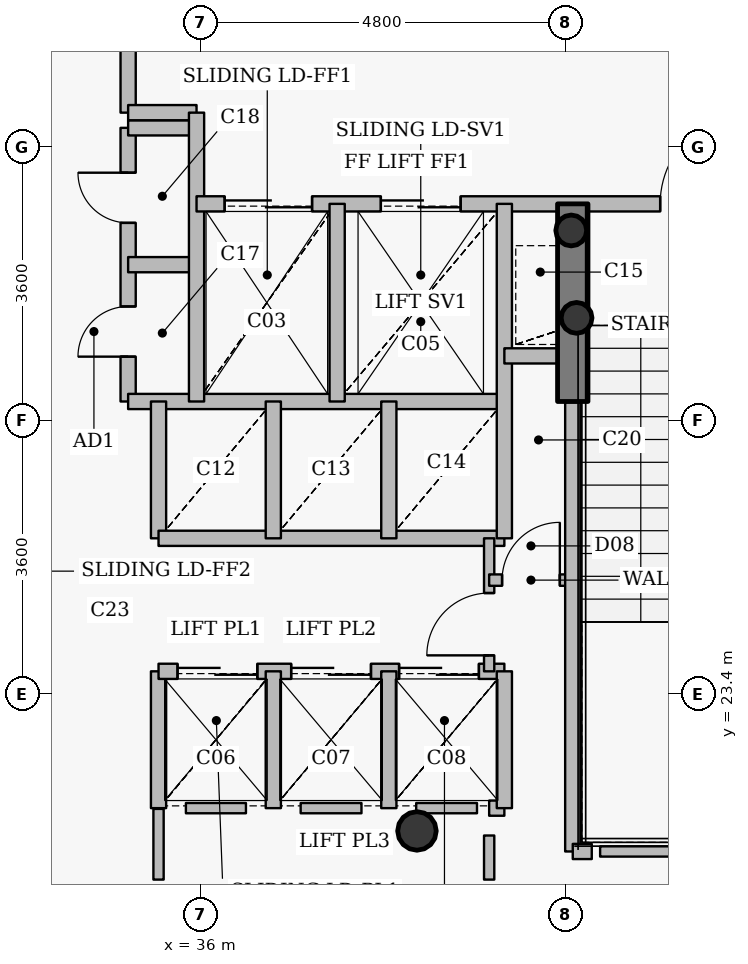
"""IFC4 building model, lengths in metres.
Left out: names, types, materials, properties, quantities, classifications, styles, units other than length and angle.
Written with IfcOpenShell. Run it as: python <this file> out.ifc"""

import sys

from ifc_helpers import new_model, si_unit, direction, frame, frame_2d, origin, origin_2d, place, context, subcontext, project, spatial, rectangle, hollow_circle, extrude, source, transform, mapped, element, fill, save


model = new_model("IFC4")
c1 = context("Model", 3, precision=1e-05, world=origin(), true_north=direction((0.0, 1.0)))
c2 = subcontext(c1, "Body", "Model", "MODEL_VIEW")
j1 = project(units=[si_unit("LENGTHUNIT", "METRE"), si_unit("PLANEANGLEUNIT", "RADIAN")], contexts=[c1])
p1 = place(None, origin())
s1 = spatial("IfcSite", under=j1, at=p1, CompositionType="ELEMENT")
p2 = place(p1, origin())
s2 = spatial("IfcBuilding", under=s1, at=p2, CompositionType="ELEMENT")
p3 = place(p2, frame((0.0, 0.0, 32.4)))
s3 = spatial("IfcBuildingStorey", under=s2, at=p3, CompositionType="ELEMENT", Elevation=32.4)
p4 = place(p3, frame((38.85, 21.6, 0.0), z_axis=(0.0, 0.0, 1.0), x_axis=(1.0, 0.0, 0.0)))
e1 = element("IfcColumn", 1, at=p4, inside=s3, PredefinedType="COLUMN", context=c2, shape_type="SweptSolid", body=[
    extrude(hollow_circle(Radius=0.254, WallThickness=0.02, at=origin_2d()), origin(), (0.0, 0.0, 1.0), 4.2),
])
for number, where, z_axis, x_axis in (
    (2, (40.95, 28.35, 0.0), (0.0, 0.0, 1.0), (1.0, 0.0, 0.0)),
    (3, (40.88, 29.5, 0.0), (0.0, 0.0, 1.0), (1.0, 0.0, 0.0)),
):
    element("IfcColumn", number, at=place(p3, frame(where, z_axis=z_axis, x_axis=x_axis)), inside=s3, PredefinedType="COLUMN", context=c2, shape_type="SweptSolid", body=[
        extrude(hollow_circle(Radius=0.203, WallThickness=0.016, at=origin_2d()), origin(), (0.0, 0.0, 1.0), 4.2),
    ])
p5 = place(p3, frame((40.9, 27.25, 0.0), z_axis=(0.0, 0.0, 1.0), x_axis=(0.0, 1.0, 0.0)))
e4 = element("IfcWall", 4, at=p5, inside=s3, PredefinedType="SHEAR", context=c2, shape_type="SweptSolid", body=[
    extrude(rectangle(XDim=2.6, YDim=0.4, at=frame_2d((1.3, 0.0))), origin(), (0.0, 0.0, 1.0), 3.55),
])
p6 = place(p3, frame((35.05, 27.25, 0.0), z_axis=(0.0, 0.0, 1.0), x_axis=(0.0, 1.0, 0.0)))
e5 = element("IfcWall", 5, at=p6, inside=s3, PredefinedType="PARTITIONING", context=c2, shape_type="SweptSolid", body=[
    extrude(rectangle(XDim=3.6, YDim=0.2, at=frame_2d((1.8, 0.0))), origin(), (0.0, 0.0, 1.0), 3.95),
])
p7 = place(p6, frame((0.59, 0.0, 0.0)))
e6 = element("IfcOpeningElement", 6, at=p7, cuts=e5, PredefinedType="OPENING", context=c2, shape_type="SweptSolid", body=[
    extrude(rectangle(XDim=0.66, YDim=2.05, at=origin_2d()), frame((0.33, 0.11, 1.025), z_axis=(0.0, -1.0, 0.0), x_axis=(1.0, 0.0, 0.0)), (0.0, 0.0, 1.0), 0.22),
])
p8 = place(p6, frame((2.35, 0.0, 0.0)))
e7 = element("IfcOpeningElement", 7, at=p8, cuts=e5, PredefinedType="OPENING", context=c2, shape_type="SweptSolid", body=[
    extrude(rectangle(XDim=0.66, YDim=2.05, at=origin_2d()), frame((0.33, 0.11, 1.025), z_axis=(0.0, -1.0, 0.0), x_axis=(1.0, 0.0, 0.0)), (0.0, 0.0, 1.0), 0.22),
])
p9 = place(p3, frame((35.05, 27.25, 0.0), z_axis=(0.0, 0.0, 1.0), x_axis=(1.0, 0.0, 0.0)))
e8 = element("IfcWall", 8, at=p9, inside=s3, PredefinedType="PARTITIONING", context=c2, shape_type="SweptSolid", body=[
    extrude(rectangle(XDim=4.95, YDim=0.2, at=frame_2d((2.475, 0.0))), origin(), (0.0, 0.0, 1.0), 3.535),
])
for number, where, z_axis, x_axis in (
    (9, (35.05, 29.05, 0.0), (0.0, 0.0, 1.0), (1.0, 0.0, 0.0)),
    (10, (35.05, 30.85, 0.0), (0.0, 0.0, 1.0), (1.0, 0.0, 0.0)),
):
    element("IfcWall", number, at=place(p3, frame(where, z_axis=z_axis, x_axis=x_axis)), inside=s3, PredefinedType="PARTITIONING", context=c2, shape_type="SweptSolid", body=[
        extrude(rectangle(XDim=0.9, YDim=0.2, at=frame_2d((0.45, 0.0))), origin(), (0.0, 0.0, 1.0), 3.95),
    ])
p10 = place(p3, frame((35.05, 31.05, 0.0), z_axis=(0.0, 0.0, 1.0), x_axis=(0.0, 1.0, 0.0)))
e11 = element("IfcWall", 11, at=p10, inside=s3, PredefinedType="PARTITIONING", context=c2, shape_type="SweptSolid", body=[
    extrude(rectangle(XDim=2.25, YDim=0.135, at=frame_2d((1.125, 0.0))), origin(), (0.0, 0.0, 1.0), 3.535),
])
p11 = place(p10, frame((0.575, 0.0, 0.0)))
e12 = element("IfcOpeningElement", 12, at=p11, cuts=e11, PredefinedType="OPENING", context=c2, shape_type="SweptSolid", body=[
    extrude(rectangle(XDim=1.1, YDim=2.15, at=origin_2d()), frame((0.55, 0.078, 1.075), z_axis=(0.0, -1.0, 0.0), x_axis=(1.0, 0.0, 0.0)), (0.0, 0.0, 1.0), 0.155),
])
p12 = place(p3, frame((35.05, 31.05, 0.0), z_axis=(0.0, 0.0, 1.0), x_axis=(1.0, 0.0, 0.0)))
e13 = element("IfcWall", 13, at=p12, inside=s3, PredefinedType="PARTITIONING", context=c2, shape_type="SweptSolid", body=[
    extrude(rectangle(XDim=0.9, YDim=0.135, at=frame_2d((0.45, 0.0))), origin(), (0.0, 0.0, 1.0), 3.95),
])
p13 = place(p3, frame((35.45, 21.9, 0.0), z_axis=(0.0, 0.0, 1.0), x_axis=(0.0, 1.0, 0.0)))
e14 = element("IfcWall", 14, at=p13, inside=s3, PredefinedType="PARTITIONING", context=c2, shape_type="SweptSolid", body=[
    extrude(rectangle(XDim=1.8, YDim=0.2, at=frame_2d((0.9, 0.0))), origin(), (0.0, 0.0, 1.0), 3.95),
])
p14 = place(p3, frame((35.45, 23.7, 0.0), z_axis=(0.0, 0.0, 1.0), x_axis=(1.0, 0.0, 0.0)))
e15 = element("IfcWall", 15, at=p14, inside=s3, PredefinedType="PARTITIONING", context=c2, shape_type="SweptSolid", body=[
    extrude(rectangle(XDim=4.55, YDim=0.2, at=frame_2d((2.275, 0.0))), origin(), (0.0, 0.0, 1.0), 3.535),
])
p15 = place(p14, frame((0.25, 0.0, 0.0)))
e16 = element("IfcOpeningElement", 16, at=p15, cuts=e15, PredefinedType="OPENING", context=c2, shape_type="SweptSolid", body=[
    extrude(rectangle(XDim=1.05, YDim=2.15, at=origin_2d()), frame((0.525, 0.11, 1.075), z_axis=(0.0, -1.0, 0.0), x_axis=(1.0, 0.0, 0.0)), (0.0, 0.0, 1.0), 0.22),
])
p16 = place(p14, frame((1.745, 0.0, 0.0)))
e17 = element("IfcOpeningElement", 17, at=p16, cuts=e15, PredefinedType="OPENING", context=c2, shape_type="SweptSolid", body=[
    extrude(rectangle(XDim=1.05, YDim=2.15, at=origin_2d()), frame((0.525, 0.11, 1.075), z_axis=(0.0, -1.0, 0.0), x_axis=(1.0, 0.0, 0.0)), (0.0, 0.0, 1.0), 0.22),
])
p17 = place(p14, frame((3.165, 0.0, 0.0)))
e18 = element("IfcOpeningElement", 18, at=p17, cuts=e15, PredefinedType="OPENING", context=c2, shape_type="SweptSolid", body=[
    extrude(rectangle(XDim=1.05, YDim=2.15, at=origin_2d()), frame((0.525, 0.11, 1.075), z_axis=(0.0, -1.0, 0.0), x_axis=(1.0, 0.0, 0.0)), (0.0, 0.0, 1.0), 0.22),
])
p18 = place(p3, frame((35.45, 25.45, 0.0), z_axis=(0.0, 0.0, 1.0), x_axis=(0.0, 1.0, 0.0)))
e19 = element("IfcWall", 19, at=p18, inside=s3, PredefinedType="PARTITIONING", context=c2, shape_type="SweptSolid", body=[
    extrude(rectangle(XDim=1.8, YDim=0.2, at=frame_2d((0.9, 0.0))), origin(), (0.0, 0.0, 1.0), 3.95),
])
p19 = place(p3, frame((35.45, 25.45, 0.0), z_axis=(0.0, 0.0, 1.0), x_axis=(1.0, 0.0, 0.0)))
e20 = element("IfcWall", 20, at=p19, inside=s3, PredefinedType="PARTITIONING", context=c2, shape_type="SweptSolid", body=[
    extrude(rectangle(XDim=4.55, YDim=0.2, at=frame_2d((2.275, 0.0))), origin(), (0.0, 0.0, 1.0), 3.535),
])
p20 = place(p3, frame((35.95, 27.25, 0.0), z_axis=(0.0, 0.0, 1.0), x_axis=(0.0, 1.0, 0.0)))
e21 = element("IfcWall", 21, at=p20, inside=s3, PredefinedType="PARTITIONING", context=c2, shape_type="SweptSolid", body=[
    extrude(rectangle(XDim=3.8, YDim=0.2, at=frame_2d((1.9, 0.0))), origin(), (0.0, 0.0, 1.0), 3.95),
])
p21 = place(p3, frame((35.95, 29.85, 0.0), z_axis=(0.0, 0.0, 1.0), x_axis=(1.0, 0.0, 0.0)))
e22 = element("IfcWall", 22, at=p21, inside=s3, PredefinedType="PARTITIONING", context=c2, shape_type="SweptSolid", body=[
    extrude(rectangle(XDim=8.49, YDim=0.2, at=frame_2d((4.245, 0.0))), origin(), (0.0, 0.0, 1.0), 3.535),
])
p22 = place(p21, frame((6.1, 0.0, 0.0)))
e23 = element("IfcOpeningElement", 23, at=p22, cuts=e22, PredefinedType="OPENING", context=c2, shape_type="SweptSolid", body=[
    extrude(rectangle(XDim=1.2, YDim=2.15, at=origin_2d()), frame((0.6, 0.11, 1.075), z_axis=(0.0, -1.0, 0.0), x_axis=(1.0, 0.0, 0.0)), (0.0, 0.0, 1.0), 0.22),
])
p23 = place(p21, frame((0.37, 0.0, 0.0)))
e24 = element("IfcOpeningElement", 24, at=p23, cuts=e22, PredefinedType="OPENING", context=c2, shape_type="SweptSolid", body=[
    extrude(rectangle(XDim=1.15, YDim=2.15, at=origin_2d()), frame((0.575, 0.11, 1.075), z_axis=(0.0, -1.0, 0.0), x_axis=(1.0, 0.0, 0.0)), (0.0, 0.0, 1.0), 0.22),
])
p24 = place(p21, frame((2.425, 0.0, 0.0)))
e25 = element("IfcOpeningElement", 25, at=p24, cuts=e22, PredefinedType="OPENING", context=c2, shape_type="SweptSolid", body=[
    extrude(rectangle(XDim=1.05, YDim=2.15, at=origin_2d()), frame((0.525, 0.11, 1.075), z_axis=(0.0, -1.0, 0.0), x_axis=(1.0, 0.0, 0.0)), (0.0, 0.0, 1.0), 0.22),
])
p25 = place(p3, frame((35.96, 31.05, 0.0), z_axis=(0.0, 0.0, 1.0), x_axis=(1.0, 0.0, 0.0)))
e26 = element("IfcWall", 26, at=p25, inside=s3, PredefinedType="PARTITIONING", context=c2, shape_type="SweptSolid", body=[
    extrude(rectangle(XDim=1.84, YDim=0.2, at=frame_2d((0.92, 0.0))), origin(), (0.0, 0.0, 1.0), 3.95),
])
for number, where, z_axis, x_axis in (
    (27, (36.96, 21.9, 0.0), (0.0, 0.0, 1.0), (0.0, 1.0, 0.0)),
    (28, (36.96, 25.45, 0.0), (0.0, 0.0, 1.0), (0.0, 1.0, 0.0)),
):
    element("IfcWall", number, at=place(p3, frame(where, z_axis=z_axis, x_axis=x_axis)), inside=s3, PredefinedType="PARTITIONING", context=c2, shape_type="SweptSolid", body=[
        extrude(rectangle(XDim=1.8, YDim=0.2, at=frame_2d((0.9, 0.0))), origin(), (0.0, 0.0, 1.0), 3.95),
    ])
p26 = place(p3, frame((37.8, 27.25, 0.0), z_axis=(0.0, 0.0, 1.0), x_axis=(0.0, 1.0, 0.0)))
e29 = element("IfcWall", 29, at=p26, inside=s3, PredefinedType="PARTITIONING", context=c2, shape_type="SweptSolid", body=[
    extrude(rectangle(XDim=2.6, YDim=0.2, at=frame_2d((1.3, 0.0))), origin(), (0.0, 0.0, 1.0), 3.95),
])
p27 = place(p3, frame((37.8, 31.05, 0.0), z_axis=(0.0, 0.0, 1.0), x_axis=(0.0, 1.0, 0.0)))
e30 = element("IfcWall", 30, at=p27, inside=s3, PredefinedType="PARTITIONING", context=c2, shape_type="SweptSolid", body=[
    extrude(rectangle(XDim=2.25, YDim=0.2, at=frame_2d((1.125, 0.0))), origin(), (0.0, 0.0, 1.0), 3.535),
])
for number, where, z_axis, x_axis in (
    (31, (38.48, 21.9, 0.0), (0.0, 0.0, 1.0), (0.0, 1.0, 0.0)),
    (32, (38.48, 25.45, 0.0), (0.0, 0.0, 1.0), (0.0, 1.0, 0.0)),
):
    element("IfcWall", number, at=place(p3, frame(where, z_axis=z_axis, x_axis=x_axis)), inside=s3, PredefinedType="PARTITIONING", context=c2, shape_type="SweptSolid", body=[
        extrude(rectangle(XDim=1.8, YDim=0.2, at=frame_2d((0.9, 0.0))), origin(), (0.0, 0.0, 1.0), 3.95),
    ])
p28 = place(p3, frame((39.8, 21.9, 0.0), z_axis=(0.0, 0.0, 1.0), x_axis=(1.0, 0.0, 0.0)))
e33 = element("IfcWall", 33, at=p28, inside=s3, PredefinedType="PARTITIONING", context=c2, shape_type="SweptSolid", body=[
    extrude(rectangle(XDim=0.2, YDim=0.2, at=frame_2d((0.1, 0.0))), origin(), (0.0, 0.0, 1.0), 3.95),
])
p29 = place(p3, frame((39.8, 23.7, 0.0), z_axis=(0.0, 0.0, 1.0), x_axis=(0.0, 1.0, 0.0)))
e34 = element("IfcWall", 34, at=p29, inside=s3, PredefinedType="PARTITIONING", context=c2, shape_type="SweptSolid", body=[
    extrude(rectangle(XDim=1.75, YDim=0.135, at=frame_2d((0.875, 0.0))), origin(), (0.0, 0.0, 1.0), 3.95),
])
p30 = place(p29, frame((0.21, 0.0, 0.0)))
e35 = element("IfcOpeningElement", 35, at=p30, cuts=e34, PredefinedType="OPENING", context=c2, shape_type="SweptSolid", body=[
    extrude(rectangle(XDim=0.82, YDim=2.1, at=origin_2d()), frame((0.41, 0.078, 1.05), z_axis=(0.0, -1.0, 0.0), x_axis=(1.0, 0.0, 0.0)), (0.0, 0.0, 1.0), 0.155),
])
p31 = place(p3, frame((39.8, 24.9, 0.0), z_axis=(0.0, 0.0, 1.0), x_axis=(1.0, 0.0, 0.0)))
e36 = element("IfcWall", 36, at=p31, inside=s3, PredefinedType="PARTITIONING", context=c2, shape_type="SweptSolid", body=[
    extrude(rectangle(XDim=1.1, YDim=0.15, at=frame_2d((0.55, 0.0))), origin(), (0.0, 0.0, 1.0), 3.95),
])
p32 = place(p31, frame((0.17, 0.0, 0.0)))
e37 = element("IfcOpeningElement", 37, at=p32, cuts=e36, PredefinedType="OPENING", context=c2, shape_type="SweptSolid", body=[
    extrude(rectangle(XDim=0.76, YDim=2.1, at=origin_2d()), frame((0.38, 0.085, 1.05), z_axis=(0.0, -1.0, 0.0), x_axis=(1.0, 0.0, 0.0)), (0.0, 0.0, 1.0), 0.17),
])
p33 = place(p3, frame((40.0, 21.9, 0.0), z_axis=(0.0, 0.0, 1.0), x_axis=(0.0, 1.0, 0.0)))
e38 = element("IfcWall", 38, at=p33, inside=s3, PredefinedType="PARTITIONING", context=c2, shape_type="SweptSolid", body=[
    extrude(rectangle(XDim=1.8, YDim=0.2, at=frame_2d((0.9, 0.0))), origin(), (0.0, 0.0, 1.0), 3.95),
])
p34 = place(p3, frame((40.0, 25.45, 0.0), z_axis=(0.0, 0.0, 1.0), x_axis=(0.0, 1.0, 0.0)))
e39 = element("IfcWall", 39, at=p34, inside=s3, PredefinedType="PARTITIONING", context=c2, shape_type="SweptSolid", body=[
    extrude(rectangle(XDim=4.4, YDim=0.2, at=frame_2d((2.2, 0.0))), origin(), (0.0, 0.0, 1.0), 3.95),
])
p35 = place(p3, frame((40.0, 27.85, 0.0), z_axis=(0.0, 0.0, 1.0), x_axis=(1.0, 0.0, 0.0)))
e40 = element("IfcWall", 40, at=p35, inside=s3, PredefinedType="PARTITIONING", context=c2, shape_type="SweptSolid", body=[
    extrude(rectangle(XDim=0.9, YDim=0.2, at=frame_2d((0.45, 0.0))), origin(), (0.0, 0.0, 1.0), 3.95),
])
p36 = place(p3, frame((40.9, 21.33, 0.0), z_axis=(0.0, 0.0, 1.0), x_axis=(0.0, 1.0, 0.0)))
e41 = element("IfcWall", 41, at=p36, inside=s3, PredefinedType="PARTITIONING", context=c2, shape_type="SweptSolid", body=[
    extrude(rectangle(XDim=5.91, YDim=0.2, at=frame_2d((2.955, 0.0))), origin(), (0.0, 0.0, 1.0), 3.485),
])
p37 = place(p3, frame((40.9, 21.33, 0.0), z_axis=(0.0, 0.0, 1.0), x_axis=(1.0, 0.0, 0.0)))
e42 = element("IfcWall", 42, at=p37, inside=s3, PredefinedType="PARTITIONING", context=c2, shape_type="SweptSolid", body=[
    extrude(rectangle(XDim=0.25, YDim=0.2, at=frame_2d((0.125, 0.0))), origin(), (0.0, 0.0, 1.0), 3.485),
])
p38 = place(p3, frame((44.08, 21.33, 0.0), z_axis=(0.0, 0.0, 1.0), x_axis=(-1.0, 0.0, 0.0)))
e43 = element("IfcWall", 43, at=p38, inside=s3, PredefinedType="PARTITIONING", context=c2, shape_type="SweptSolid", body=[
    extrude(rectangle(XDim=2.82, YDim=0.135, at=frame_2d((1.41, 0.0))), origin(), (0.0, 0.0, 1.0), 3.485),
])
p39 = place(p3, frame((36.6, 21.9, 0.0), z_axis=(0.0, 0.0, 1.0), x_axis=(-1.0, 0.0, 0.0)))
e44 = element("IfcWall", 44, at=p39, inside=s3, PredefinedType="PARTITIONING", context=c2, shape_type="SweptSolid", body=[
    extrude(rectangle(XDim=0.79, YDim=0.135, at=frame_2d((0.395, 0.0))), origin(), (0.0, 0.0, 1.0), 3.95),
])
p40 = place(p3, frame((38.12, 21.9, 0.0), z_axis=(0.0, 0.0, 1.0), x_axis=(-1.0, 0.0, 0.0)))
e45 = element("IfcWall", 45, at=p40, inside=s3, PredefinedType="PARTITIONING", context=c2, shape_type="SweptSolid", body=[
    extrude(rectangle(XDim=0.8, YDim=0.135, at=frame_2d((0.4, 0.0))), origin(), (0.0, 0.0, 1.0), 3.95),
])
p41 = place(p3, frame((39.64, 21.9, 0.0), z_axis=(0.0, 0.0, 1.0), x_axis=(-1.0, 0.0, 0.0)))
e46 = element("IfcWall", 46, at=p41, inside=s3, PredefinedType="PARTITIONING", context=c2, shape_type="SweptSolid", body=[
    extrude(rectangle(XDim=0.8, YDim=0.135, at=frame_2d((0.4, 0.0))), origin(), (0.0, 0.0, 1.0), 3.535),
])
p42 = place(p3, frame((39.8, 20.96, 0.0), z_axis=(0.0, 0.0, 1.0), x_axis=(0.0, 1.0, 0.0)))
e47 = element("IfcWall", 47, at=p42, inside=s3, PredefinedType="PARTITIONING", context=c2, shape_type="SweptSolid", body=[
    extrude(rectangle(XDim=0.58, YDim=0.135, at=frame_2d((0.29, 0.0))), origin(), (0.0, 0.0, 1.0), 3.485),
])
p43 = place(p3, frame((35.45, 21.89, 0.0), z_axis=(0.0, 0.0, 1.0), x_axis=(0.0, -1.0, 0.0)))
e48 = element("IfcWall", 48, at=p43, inside=s3, PredefinedType="PARTITIONING", context=c2, shape_type="SweptSolid", body=[
    extrude(rectangle(XDim=0.93, YDim=0.135, at=frame_2d((0.465, 0.0))), origin(), (0.0, 0.0, 1.0), 3.535),
])
m1 = source(origin(), c2, "Body", "SweptSolid", [
    extrude(rectangle(XDim=1.2, YDim=2.15, at=origin_2d()), frame((0.6, 0.025, 1.075), z_axis=(0.0, -1.0, 0.0), x_axis=(1.0, 0.0, 0.0)), (0.0, 0.0, 1.0), 0.05),
])
p44 = place(p22, origin())
e49 = element("IfcDoor", 49, at=p44, inside=s3, OperationType="SINGLE_SWING_RIGHT", PredefinedType="DOOR", context=c2, shape_type="MappedRepresentation", body=[
    mapped(m1, transform((0.0, 0.0, 0.0), x_axis=(1.0, 0.0, 0.0), y_axis=(0.0, 1.0, 0.0), z_axis=(0.0, 0.0, 1.0), scale=1.0)),
])
fill(e23, e49)
m2 = source(origin(), c2, "Body", "SweptSolid", [
    extrude(rectangle(XDim=1.15, YDim=2.15, at=origin_2d()), frame((0.575, 0.025, 1.075), z_axis=(0.0, -1.0, 0.0), x_axis=(1.0, 0.0, 0.0)), (0.0, 0.0, 1.0), 0.05),
])
p45 = place(p23, origin())
e50 = element("IfcDoor", 50, at=p45, inside=s3, OperationType="DOUBLE_DOOR_SLIDING", PredefinedType="USERDEFINED", context=c2, shape_type="MappedRepresentation", body=[
    mapped(m2, transform((0.0, 0.0, 0.0), x_axis=(1.0, 0.0, 0.0), y_axis=(0.0, 1.0, 0.0), z_axis=(0.0, 0.0, 1.0), scale=1.0)),
])
fill(e24, e50)
m3 = source(origin(), c2, "Body", "SweptSolid", [
    extrude(rectangle(XDim=1.05, YDim=2.15, at=origin_2d()), frame((0.525, 0.025, 1.075), z_axis=(0.0, -1.0, 0.0), x_axis=(1.0, 0.0, 0.0)), (0.0, 0.0, 1.0), 0.05),
])
p46 = place(p24, origin())
e51 = element("IfcDoor", 51, at=p46, inside=s3, OperationType="DOUBLE_DOOR_SLIDING", PredefinedType="USERDEFINED", context=c2, shape_type="MappedRepresentation", body=[
    mapped(m3, transform((0.0, 0.0, 0.0), x_axis=(1.0, 0.0, 0.0), y_axis=(0.0, 1.0, 0.0), z_axis=(0.0, 0.0, 1.0), scale=1.0)),
])
fill(e25, e51)
p47 = place(p15, origin())
e52 = element("IfcDoor", 52, at=p47, inside=s3, OperationType="DOUBLE_DOOR_SLIDING", PredefinedType="USERDEFINED", context=c2, shape_type="MappedRepresentation", body=[
    mapped(m3, transform((0.0, 0.0, 0.0), x_axis=(1.0, 0.0, 0.0), y_axis=(0.0, 1.0, 0.0), z_axis=(0.0, 0.0, 1.0), scale=1.0)),
])
fill(e16, e52)
p48 = place(p16, origin())
e53 = element("IfcDoor", 53, at=p48, inside=s3, OperationType="DOUBLE_DOOR_SLIDING", PredefinedType="USERDEFINED", context=c2, shape_type="MappedRepresentation", body=[
    mapped(m3, transform((0.0, 0.0, 0.0), x_axis=(1.0, 0.0, 0.0), y_axis=(0.0, 1.0, 0.0), z_axis=(0.0, 0.0, 1.0), scale=1.0)),
])
fill(e17, e53)
p49 = place(p17, origin())
e54 = element("IfcDoor", 54, at=p49, inside=s3, OperationType="DOUBLE_DOOR_SLIDING", PredefinedType="USERDEFINED", context=c2, shape_type="MappedRepresentation", body=[
    mapped(m3, transform((0.0, 0.0, 0.0), x_axis=(1.0, 0.0, 0.0), y_axis=(0.0, 1.0, 0.0), z_axis=(0.0, 0.0, 1.0), scale=1.0)),
])
fill(e18, e54)
m4 = source(origin(), c2, "Body", "SweptSolid", [
    extrude(rectangle(XDim=0.66, YDim=2.05, at=origin_2d()), frame((0.33, 0.025, 1.025), z_axis=(0.0, -1.0, 0.0), x_axis=(1.0, 0.0, 0.0)), (0.0, 0.0, 1.0), 0.05),
])
p50 = place(p7, origin())
e55 = element("IfcDoor", 55, at=p50, inside=s3, OperationType="SINGLE_SWING_LEFT", PredefinedType="USERDEFINED", context=c2, shape_type="MappedRepresentation", body=[
    mapped(m4, transform((0.0, 0.0, 0.0), x_axis=(1.0, 0.0, 0.0), y_axis=(0.0, 1.0, 0.0), z_axis=(0.0, 0.0, 1.0), scale=1.0)),
])
fill(e6, e55)
p51 = place(p8, origin())
e56 = element("IfcDoor", 56, at=p51, inside=s3, OperationType="SINGLE_SWING_RIGHT", PredefinedType="USERDEFINED", context=c2, shape_type="MappedRepresentation", body=[
    mapped(m4, transform((0.0, 0.0, 0.0), x_axis=(1.0, 0.0, 0.0), y_axis=(0.0, 1.0, 0.0), z_axis=(0.0, 0.0, 1.0), scale=1.0)),
])
fill(e7, e56)
m5 = source(origin(), c2, "Body", "SweptSolid", [
    extrude(rectangle(XDim=1.1, YDim=2.15, at=origin_2d()), frame((0.55, 0.025, 1.075), z_axis=(0.0, -1.0, 0.0), x_axis=(1.0, 0.0, 0.0)), (0.0, 0.0, 1.0), 0.05),
])
p52 = place(p11, origin())
e57 = element("IfcDoor", 57, at=p52, inside=s3, OperationType="SINGLE_SWING_LEFT", PredefinedType="DOOR", context=c2, shape_type="MappedRepresentation", body=[
    mapped(m5, transform((0.0, 0.0, 0.0), x_axis=(1.0, 0.0, 0.0), y_axis=(0.0, 1.0, 0.0), z_axis=(0.0, 0.0, 1.0), scale=1.0)),
])
fill(e12, e57)
m6 = source(origin(), c2, "Body", "SweptSolid", [
    extrude(rectangle(XDim=0.82, YDim=2.1, at=origin_2d()), frame((0.41, 0.025, 1.05), z_axis=(0.0, -1.0, 0.0), x_axis=(1.0, 0.0, 0.0)), (0.0, 0.0, 1.0), 0.05),
])
p53 = place(p30, origin())
e58 = element("IfcDoor", 58, at=p53, inside=s3, OperationType="SINGLE_SWING_RIGHT", PredefinedType="DOOR", context=c2, shape_type="MappedRepresentation", body=[
    mapped(m6, transform((0.0, 0.0, 0.0), x_axis=(1.0, 0.0, 0.0), y_axis=(0.0, 1.0, 0.0), z_axis=(0.0, 0.0, 1.0), scale=1.0)),
])
fill(e35, e58)
m7 = source(origin(), c2, "Body", "SweptSolid", [
    extrude(rectangle(XDim=0.76, YDim=2.1, at=origin_2d()), frame((0.38, 0.025, 1.05), z_axis=(0.0, -1.0, 0.0), x_axis=(1.0, 0.0, 0.0)), (0.0, 0.0, 1.0), 0.05),
])
p54 = place(p32, origin())
e59 = element("IfcDoor", 59, at=p54, inside=s3, OperationType="SINGLE_SWING_LEFT", PredefinedType="DOOR", context=c2, shape_type="MappedRepresentation", body=[
    mapped(m7, transform((0.0, 0.0, 0.0), x_axis=(1.0, 0.0, 0.0), y_axis=(0.0, 1.0, 0.0), z_axis=(0.0, 0.0, 1.0), scale=1.0)),
])
fill(e37, e59)
save(model, sys.argv[1])
